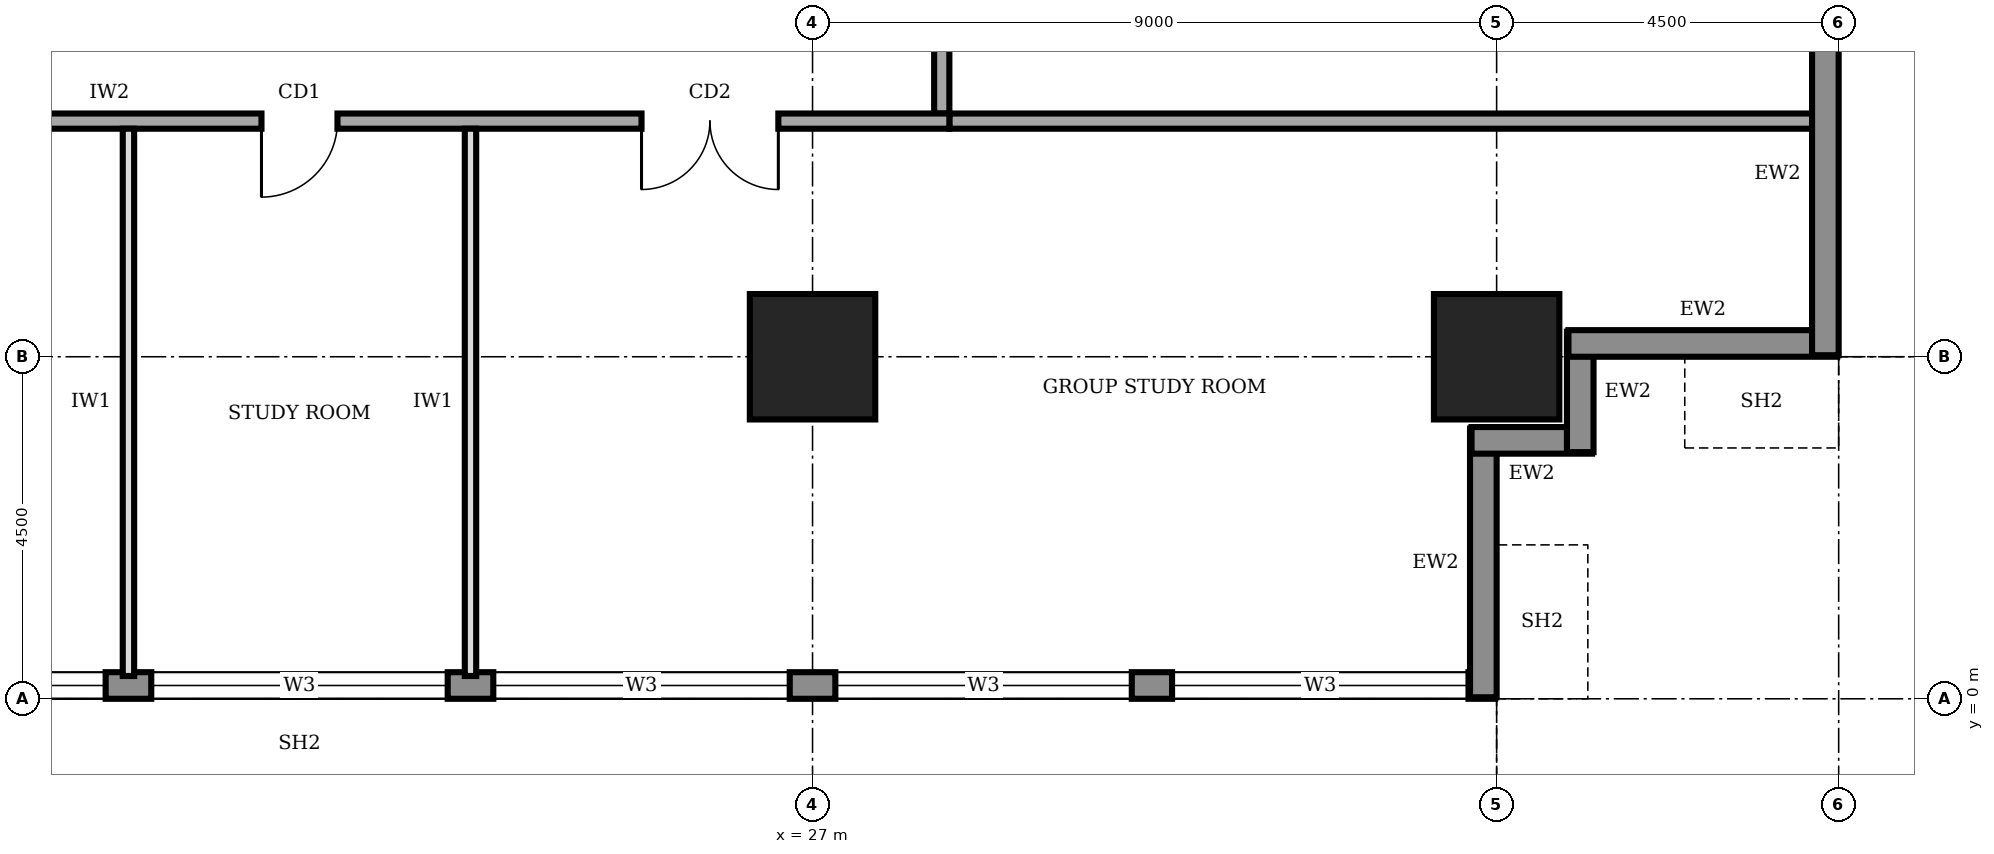
"""IFC4 building model, lengths in metres.
Left out: names, types, materials, properties, quantities, classifications, styles, units other than length and angle.
Written with IfcOpenShell. Run it as: python <this file> out.ifc"""

import sys

from ifc_helpers import new_model, si_unit, direction, frame, frame_2d, origin, origin_2d, place, context, subcontext, project, spatial, rectangle, extrude, element, fill, save


model = new_model("IFC4")
c1 = context("Model", 3, precision=1e-05, world=origin(), true_north=direction((0.0, 1.0)))
c2 = subcontext(c1, "Body", "Model", "MODEL_VIEW")
j1 = project(units=[si_unit("LENGTHUNIT", "METRE"), si_unit("PLANEANGLEUNIT", "RADIAN")], contexts=[c1])
p1 = place(None, origin())
s1 = spatial("IfcSite", under=j1, at=p1, CompositionType="ELEMENT")
p2 = place(p1, origin())
s2 = spatial("IfcBuilding", under=s1, at=p2, CompositionType="ELEMENT")
p3 = place(p2, frame((0.0, 0.0, 197.0)))
s3 = spatial("IfcBuildingStorey", under=s2, at=p3, CompositionType="ELEMENT", Elevation=197.0)
for number, where, z_axis, x_axis in (
    (1, (27.0, 4.5, 0.0), (0.0, 0.0, 1.0), (1.0, 0.0, 0.0)),
    (2, (36.0, 4.5, 0.0), (0.0, 0.0, 1.0), (1.0, 0.0, 0.0)),
):
    element("IfcColumn", number, at=place(p3, frame(where, z_axis=z_axis, x_axis=x_axis)), inside=s3, PredefinedType="COLUMN", context=c2, shape_type="SweptSolid", body=[
        extrude(rectangle(XDim=1.65, YDim=1.65, at=origin_2d()), origin(), (0.0, 0.0, 1.0), 4.0),
    ])
p4 = place(p3, frame((4.52, 0.175, 0.0), z_axis=(0.0, 0.0, 1.0), x_axis=(1.0, 0.0, 0.0)))
e3 = element("IfcWall", 3, at=p4, inside=s3, PredefinedType="STANDARD", context=c2, shape_type="SweptSolid", body=[
    extrude(rectangle(XDim=31.46, YDim=0.35, at=frame_2d((15.73, 0.0))), origin(), (0.0, 0.0, 1.0), 3.75),
])
p5 = place(p4, frame((4.78, 0.0, 0.95)))
e4 = element("IfcOpeningElement", 4, at=p5, cuts=e3, PredefinedType="OPENING", context=c2, shape_type="SweptSolid", body=[
    extrude(rectangle(XDim=3.9, YDim=1.8, at=frame_2d((1.95, 0.9))), frame((0.0, 0.185, 0.0), z_axis=(0.0, -1.0, 0.0), x_axis=(1.0, 0.0, 0.0)), (0.0, 0.0, 1.0), 0.37),
])
p6 = place(p4, frame((9.28, 0.0, 0.95)))
e5 = element("IfcOpeningElement", 5, at=p6, cuts=e3, PredefinedType="OPENING", context=c2, shape_type="SweptSolid", body=[
    extrude(rectangle(XDim=3.9, YDim=1.8, at=frame_2d((1.95, 0.9))), frame((0.0, 0.185, 0.0), z_axis=(0.0, -1.0, 0.0), x_axis=(1.0, 0.0, 0.0)), (0.0, 0.0, 1.0), 0.37),
])
p7 = place(p4, frame((13.78, 0.0, 0.95)))
e6 = element("IfcOpeningElement", 6, at=p7, cuts=e3, PredefinedType="OPENING", context=c2, shape_type="SweptSolid", body=[
    extrude(rectangle(XDim=3.9, YDim=1.8, at=frame_2d((1.95, 0.9))), frame((0.0, 0.185, 0.0), z_axis=(0.0, -1.0, 0.0), x_axis=(1.0, 0.0, 0.0)), (0.0, 0.0, 1.0), 0.37),
])
p8 = place(p4, frame((18.28, 0.0, 0.95)))
e7 = element("IfcOpeningElement", 7, at=p8, cuts=e3, PredefinedType="OPENING", context=c2, shape_type="SweptSolid", body=[
    extrude(rectangle(XDim=3.9, YDim=1.8, at=frame_2d((1.95, 0.9))), frame((0.0, 0.185, 0.0), z_axis=(0.0, -1.0, 0.0), x_axis=(1.0, 0.0, 0.0)), (0.0, 0.0, 1.0), 0.37),
])
p9 = place(p4, frame((22.78, 0.0, 0.95)))
e8 = element("IfcOpeningElement", 8, at=p9, cuts=e3, PredefinedType="OPENING", context=c2, shape_type="SweptSolid", body=[
    extrude(rectangle(XDim=3.9, YDim=1.8, at=frame_2d((1.95, 0.9))), frame((0.0, 0.185, 0.0), z_axis=(0.0, -1.0, 0.0), x_axis=(1.0, 0.0, 0.0)), (0.0, 0.0, 1.0), 0.37),
])
p10 = place(p4, frame((27.21, 0.0, 0.95)))
e9 = element("IfcOpeningElement", 9, at=p10, cuts=e3, PredefinedType="OPENING", context=c2, shape_type="SweptSolid", body=[
    extrude(rectangle(XDim=3.9, YDim=1.8, at=frame_2d((1.95, 0.9))), frame((0.0, 0.185, 0.0), z_axis=(0.0, -1.0, 0.0), x_axis=(1.0, 0.0, 0.0)), (0.0, 0.0, 1.0), 0.37),
])
p11 = place(p3, frame((35.825, 0.02, 0.0), z_axis=(0.0, 0.0, 1.0), x_axis=(0.0, 1.0, 0.0)))
e10 = element("IfcWall", 10, at=p11, inside=s3, PredefinedType="STANDARD", context=c2, shape_type="SweptSolid", body=[
    extrude(rectangle(XDim=3.535, YDim=0.35, at=frame_2d((1.768, 0.0))), origin(), (0.0, 0.0, 1.0), 2.85),
])
for number, where, z_axis, x_axis in (
    (11, (35.67, 3.4, 0.0), (0.0, 0.0, 1.0), (1.0, 0.0, 0.0)),
    (12, (37.1, 3.245, 0.0), (0.0, 0.0, 1.0), (0.0, 1.0, 0.0)),
):
    element("IfcWall", number, at=place(p3, frame(where, z_axis=z_axis, x_axis=x_axis)), inside=s3, PredefinedType="STANDARD", context=c2, shape_type="SweptSolid", body=[
        extrude(rectangle(XDim=1.585, YDim=0.35, at=frame_2d((0.792, 0.0))), origin(), (0.0, 0.0, 1.0), 3.75),
    ])
p12 = place(p3, frame((36.945, 4.675, 0.0), z_axis=(0.0, 0.0, 1.0), x_axis=(1.0, 0.0, 0.0)))
e13 = element("IfcWall", 13, at=p12, inside=s3, PredefinedType="STANDARD", context=c2, shape_type="SweptSolid", body=[
    extrude(rectangle(XDim=3.535, YDim=0.35, at=frame_2d((1.768, 0.0))), origin(), (0.0, 0.0, 1.0), 2.85),
])
p13 = place(p3, frame((40.325, 4.52, 0.0), z_axis=(0.0, 0.0, 1.0), x_axis=(0.0, 1.0, 0.0)))
e14 = element("IfcWall", 14, at=p13, inside=s3, PredefinedType="STANDARD", context=c2, shape_type="SweptSolid", body=[
    extrude(rectangle(XDim=31.46, YDim=0.35, at=frame_2d((15.73, 0.0))), origin(), (0.0, 0.0, 1.0), 3.75),
])
p14 = place(p13, frame((4.78, 0.0, 0.95)))
e15 = element("IfcOpeningElement", 15, at=p14, cuts=e14, PredefinedType="OPENING", context=c2, shape_type="SweptSolid", body=[
    extrude(rectangle(XDim=3.9, YDim=1.8, at=frame_2d((1.95, 0.9))), frame((0.0, 0.185, 0.0), z_axis=(0.0, -1.0, 0.0), x_axis=(1.0, 0.0, 0.0)), (0.0, 0.0, 1.0), 0.37),
])
p15 = place(p13, frame((9.28, 0.0, 0.95)))
e16 = element("IfcOpeningElement", 16, at=p15, cuts=e14, PredefinedType="OPENING", context=c2, shape_type="SweptSolid", body=[
    extrude(rectangle(XDim=3.9, YDim=1.8, at=frame_2d((1.95, 0.9))), frame((0.0, 0.185, 0.0), z_axis=(0.0, -1.0, 0.0), x_axis=(1.0, 0.0, 0.0)), (0.0, 0.0, 1.0), 0.37),
])
p16 = place(p13, frame((13.78, 0.0, 0.95)))
e17 = element("IfcOpeningElement", 17, at=p16, cuts=e14, PredefinedType="OPENING", context=c2, shape_type="SweptSolid", body=[
    extrude(rectangle(XDim=3.9, YDim=1.8, at=frame_2d((1.95, 0.9))), frame((0.0, 0.185, 0.0), z_axis=(0.0, -1.0, 0.0), x_axis=(1.0, 0.0, 0.0)), (0.0, 0.0, 1.0), 0.37),
])
p17 = place(p13, frame((18.28, 0.0, 0.95)))
e18 = element("IfcOpeningElement", 18, at=p17, cuts=e14, PredefinedType="OPENING", context=c2, shape_type="SweptSolid", body=[
    extrude(rectangle(XDim=3.9, YDim=1.8, at=frame_2d((1.95, 0.9))), frame((0.0, 0.185, 0.0), z_axis=(0.0, -1.0, 0.0), x_axis=(1.0, 0.0, 0.0)), (0.0, 0.0, 1.0), 0.37),
])
p18 = place(p13, frame((22.78, 0.0, 0.95)))
e19 = element("IfcOpeningElement", 19, at=p18, cuts=e14, PredefinedType="OPENING", context=c2, shape_type="SweptSolid", body=[
    extrude(rectangle(XDim=3.9, YDim=1.8, at=frame_2d((1.95, 0.9))), frame((0.0, 0.185, 0.0), z_axis=(0.0, -1.0, 0.0), x_axis=(1.0, 0.0, 0.0)), (0.0, 0.0, 1.0), 0.37),
])
p19 = place(p13, frame((27.21, 0.0, 0.95)))
e20 = element("IfcOpeningElement", 20, at=p19, cuts=e14, PredefinedType="OPENING", context=c2, shape_type="SweptSolid", body=[
    extrude(rectangle(XDim=3.9, YDim=1.8, at=frame_2d((1.95, 0.9))), frame((0.0, 0.185, 0.0), z_axis=(0.0, -1.0, 0.0), x_axis=(1.0, 0.0, 0.0)), (0.0, 0.0, 1.0), 0.37),
])
p20 = place(p3, frame((11.9, 7.6, 0.0), z_axis=(0.0, 0.0, 1.0), x_axis=(1.0, 0.0, 0.0)))
e21 = element("IfcWall", 21, at=p20, inside=s3, PredefinedType="SOLIDWALL", context=c2, shape_type="SweptSolid", body=[
    extrude(rectangle(XDim=16.9, YDim=0.2, at=frame_2d((8.45, 0.0))), origin(), (0.0, 0.0, 1.0), 3.75),
])
p21 = place(p20, frame((2.05, 0.0, 0.0)))
e22 = element("IfcOpeningElement", 22, at=p21, cuts=e21, PredefinedType="OPENING", context=c2, shape_type="SweptSolid", body=[
    extrude(rectangle(XDim=1.8, YDim=2.1, at=frame_2d((0.9, 1.05))), frame((0.0, 0.11, 0.0), z_axis=(0.0, -1.0, 0.0), x_axis=(1.0, 0.0, 0.0)), (0.0, 0.0, 1.0), 0.22),
])
p22 = place(p20, frame((7.85, 0.0, 0.0)))
e23 = element("IfcOpeningElement", 23, at=p22, cuts=e21, PredefinedType="OPENING", context=c2, shape_type="SweptSolid", body=[
    extrude(rectangle(XDim=1.0, YDim=2.1, at=frame_2d((0.5, 1.05))), frame((0.0, 0.11, 0.0), z_axis=(0.0, -1.0, 0.0), x_axis=(1.0, 0.0, 0.0)), (0.0, 0.0, 1.0), 0.22),
])
p23 = place(p20, frame((12.85, 0.0, 0.0)))
e24 = element("IfcOpeningElement", 24, at=p23, cuts=e21, PredefinedType="OPENING", context=c2, shape_type="SweptSolid", body=[
    extrude(rectangle(XDim=1.8, YDim=2.1, at=frame_2d((0.9, 1.05))), frame((0.0, 0.11, 0.0), z_axis=(0.0, -1.0, 0.0), x_axis=(1.0, 0.0, 0.0)), (0.0, 0.0, 1.0), 0.22),
])
p24 = place(p3, frame((28.7, 7.7, 0.0), z_axis=(0.0, 0.0, 1.0), x_axis=(0.0, 1.0, 0.0)))
e25 = element("IfcWall", 25, at=p24, inside=s3, PredefinedType="SOLIDWALL", context=c2, shape_type="SweptSolid", body=[
    extrude(rectangle(XDim=25.3, YDim=0.2, at=frame_2d((12.65, 0.0))), origin(), (0.0, 0.0, 1.0), 3.75),
])
p25 = place(p24, frame((4.15, 0.0, 0.0)))
e26 = element("IfcOpeningElement", 26, at=p25, cuts=e25, PredefinedType="OPENING", context=c2, shape_type="SweptSolid", body=[
    extrude(rectangle(XDim=1.8, YDim=2.1, at=frame_2d((0.9, 1.05))), frame((0.0, 0.11, 0.0), z_axis=(0.0, -1.0, 0.0), x_axis=(1.0, 0.0, 0.0)), (0.0, 0.0, 1.0), 0.22),
])
p26 = place(p24, frame((17.1, 0.0, 0.0)))
e27 = element("IfcOpeningElement", 27, at=p26, cuts=e25, PredefinedType="OPENING", context=c2, shape_type="SweptSolid", body=[
    extrude(rectangle(XDim=1.4, YDim=2.1, at=frame_2d((0.7, 1.05))), frame((0.0, 0.11, 0.0), z_axis=(0.0, -1.0, 0.0), x_axis=(1.0, 0.0, 0.0)), (0.0, 0.0, 1.0), 0.22),
])
p27 = place(p3, frame((28.8, 7.6, 0.0), z_axis=(0.0, 0.0, 1.0), x_axis=(1.0, 0.0, 0.0)))
e28 = element("IfcWall", 28, at=p27, inside=s3, PredefinedType="SOLIDWALL", context=c2, shape_type="SweptSolid", body=[
    extrude(rectangle(XDim=11.4, YDim=0.2, at=frame_2d((5.7, 0.0))), origin(), (0.0, 0.0, 1.0), 3.75),
])
for number, where, z_axis, x_axis in (
    (29, (18.0, 0.3, 0.0), (0.0, 0.0, 1.0), (0.0, 1.0, 0.0)),
    (30, (22.5, 0.3, 0.0), (0.0, 0.0, 1.0), (0.0, 1.0, 0.0)),
):
    element("IfcWall", number, at=place(p3, frame(where, z_axis=z_axis, x_axis=x_axis)), inside=s3, PredefinedType="PARTITIONING", context=c2, shape_type="SweptSolid", body=[
        extrude(rectangle(XDim=7.2, YDim=0.15, at=frame_2d((3.6, 0.0))), origin(), (0.0, 0.0, 1.0), 3.75),
    ])
p28 = place(p6, origin())
e31 = element("IfcWindow", 31, at=p28, inside=s3, PartitioningType="SINGLE_PANEL", PredefinedType="WINDOW", context=c2, shape_type="SweptSolid", body=[
    extrude(rectangle(XDim=3.9, YDim=1.8, at=frame_2d((1.95, 0.9))), frame((0.0, 0.03, 0.0), z_axis=(0.0, -1.0, 0.0), x_axis=(1.0, 0.0, 0.0)), (0.0, 0.0, 1.0), 0.06),
])
fill(e5, e31)
p29 = place(p7, origin())
e32 = element("IfcWindow", 32, at=p29, inside=s3, PartitioningType="SINGLE_PANEL", PredefinedType="WINDOW", context=c2, shape_type="SweptSolid", body=[
    extrude(rectangle(XDim=3.9, YDim=1.8, at=frame_2d((1.95, 0.9))), frame((0.0, 0.03, 0.0), z_axis=(0.0, -1.0, 0.0), x_axis=(1.0, 0.0, 0.0)), (0.0, 0.0, 1.0), 0.06),
])
fill(e6, e32)
p30 = place(p8, origin())
e33 = element("IfcWindow", 33, at=p30, inside=s3, PartitioningType="SINGLE_PANEL", PredefinedType="WINDOW", context=c2, shape_type="SweptSolid", body=[
    extrude(rectangle(XDim=3.9, YDim=1.8, at=frame_2d((1.95, 0.9))), frame((0.0, 0.03, 0.0), z_axis=(0.0, -1.0, 0.0), x_axis=(1.0, 0.0, 0.0)), (0.0, 0.0, 1.0), 0.06),
])
fill(e7, e33)
p31 = place(p9, origin())
e34 = element("IfcWindow", 34, at=p31, inside=s3, PartitioningType="SINGLE_PANEL", PredefinedType="WINDOW", context=c2, shape_type="SweptSolid", body=[
    extrude(rectangle(XDim=3.9, YDim=1.8, at=frame_2d((1.95, 0.9))), frame((0.0, 0.03, 0.0), z_axis=(0.0, -1.0, 0.0), x_axis=(1.0, 0.0, 0.0)), (0.0, 0.0, 1.0), 0.06),
])
fill(e8, e34)
p32 = place(p10, origin())
e35 = element("IfcWindow", 35, at=p32, inside=s3, PartitioningType="SINGLE_PANEL", PredefinedType="WINDOW", context=c2, shape_type="SweptSolid", body=[
    extrude(rectangle(XDim=3.9, YDim=1.8, at=frame_2d((1.95, 0.9))), frame((0.0, 0.03, 0.0), z_axis=(0.0, -1.0, 0.0), x_axis=(1.0, 0.0, 0.0)), (0.0, 0.0, 1.0), 0.06),
])
fill(e9, e35)
p33 = place(p22, frame((1.0, 0.0, 0.0), z_axis=(0.0, 0.0, 1.0), x_axis=(-1.0, 0.0, 0.0)))
e36 = element("IfcDoor", 36, at=p33, inside=s3, OperationType="SINGLE_SWING_RIGHT", PredefinedType="DOOR", context=c2, shape_type="SweptSolid", body=[
    extrude(rectangle(XDim=1.0, YDim=2.1, at=frame_2d((0.5, 1.05))), frame((0.0, 0.025, 0.0), z_axis=(0.0, -1.0, 0.0), x_axis=(1.0, 0.0, 0.0)), (0.0, 0.0, 1.0), 0.05),
])
fill(e23, e36)
p34 = place(p23, frame((1.8, 0.0, 0.0), z_axis=(0.0, 0.0, 1.0), x_axis=(-1.0, 0.0, 0.0)))
e37 = element("IfcDoor", 37, at=p34, inside=s3, OperationType="DOUBLE_DOOR_SINGLE_SWING", PredefinedType="DOOR", context=c2, shape_type="SweptSolid", body=[
    extrude(rectangle(XDim=1.8, YDim=2.1, at=frame_2d((0.9, 1.05))), frame((0.0, 0.025, 0.0), z_axis=(0.0, -1.0, 0.0), x_axis=(1.0, 0.0, 0.0)), (0.0, 0.0, 1.0), 0.05),
])
fill(e24, e37)
save(model, sys.argv[1])
